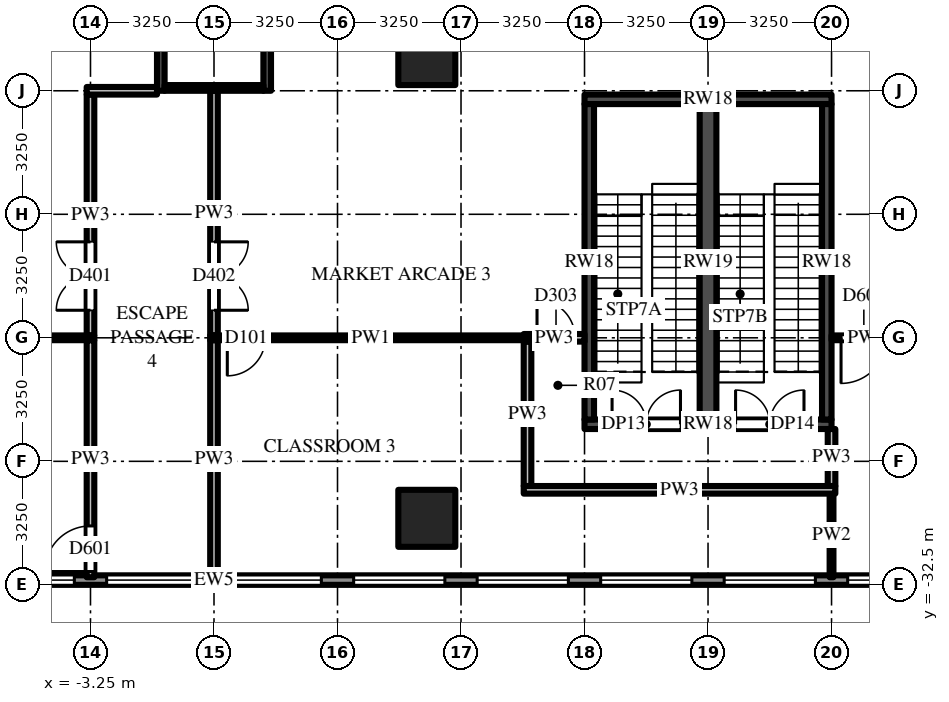
"""IFC4 building model, lengths in metres.
Left out: names, types, materials, properties, quantities, classifications, styles, units other than length and angle.
Written with IfcOpenShell. Run it as: python <this file> out.ifc"""

import sys

from ifc_helpers import new_model, si_unit, direction, frame, frame_2d, origin, origin_2d, place, context, subcontext, project, spatial, rectangle, extrude, source, transform, mapped, element, fill, save


model = new_model("IFC4")
c1 = context("Model", 3, precision=1e-05, world=origin(), true_north=direction((0.0, 1.0)))
c2 = subcontext(c1, "Body", "Model", "MODEL_VIEW")
j1 = project(units=[si_unit("LENGTHUNIT", "METRE"), si_unit("PLANEANGLEUNIT", "RADIAN")], contexts=[c1])
p1 = place(None, origin())
s1 = spatial("IfcSite", under=j1, at=p1, CompositionType="ELEMENT")
p2 = place(p1, origin())
s2 = spatial("IfcBuilding", under=s1, at=p2, CompositionType="ELEMENT")
p3 = place(p2, frame((0.0, 0.0, 24.0)))
s3 = spatial("IfcBuildingStorey", under=s2, at=p3, CompositionType="ELEMENT", Elevation=24.0)
m1 = source(origin(), c2, "Body", "SweptSolid", [
    extrude(rectangle(XDim=1.5, YDim=1.5, at=origin_2d()), origin(), (0.0, 0.0, 1.0), 5.0),
])
for number, where, z_axis, x_axis in (
    (1, (5.6, -18.6, 0.0), (0.0, 0.0, 1.0), (1.0, 0.0, 0.0)),
    (2, (5.6, -30.75, 0.0), (0.0, 0.0, 1.0), (1.0, 0.0, 0.0)),
):
    element("IfcColumn", number, at=place(p3, frame(where, z_axis=z_axis, x_axis=x_axis)), inside=s3, PredefinedType="COLUMN", context=c2, shape_type="MappedRepresentation", body=[
        mapped(m1, transform((0.0, 0.0, 0.0))),
    ])
m2 = source(origin(), c2, "Body", "SweptSolid", [
    extrude(rectangle(XDim=6.0, YDim=0.2, at=frame_2d((3.0, 0.0))), origin(), (0.0, 0.0, 1.0), 4.7),
])
for number, where, z_axis, x_axis in (
    (3, (1.4, -13.5, 0.0), (0.0, 0.0, 1.0), (0.0, -1.0, 0.0)),
    (4, (-1.4, -13.5, 0.0), (0.0, 0.0, 1.0), (0.0, -1.0, 0.0)),
):
    element("IfcWall", number, at=place(p3, frame(where, z_axis=z_axis, x_axis=x_axis)), inside=s3, PredefinedType="SHEAR", context=c2, shape_type="MappedRepresentation", body=[
        mapped(m2, transform((0.0, 0.0, 0.0))),
    ])
m3 = source(origin(), c2, "Body", "SweptSolid", [
    extrude(rectangle(XDim=2.6, YDim=0.15, at=frame_2d((1.3, 0.0))), origin(), (0.0, 0.0, 1.0), 4.7),
])
p4 = place(p3, frame((1.3, -19.425, 0.0), z_axis=(0.0, 0.0, 1.0), x_axis=(-1.0, 0.0, 0.0)))
e5 = element("IfcWall", 5, at=p4, inside=s3, PredefinedType="SHEAR", context=c2, shape_type="MappedRepresentation", body=[
    mapped(m3, transform((0.0, 0.0, 0.0))),
])
m4 = source(origin(), c2, "Body", "SweptSolid", [
    extrude(rectangle(XDim=6.5, YDim=0.25, at=frame_2d((3.25, 0.0))), origin(), (0.0, 0.0, 1.0), 4.7),
])
p5 = place(p3, frame((9.75, -28.275, 0.0), z_axis=(0.0, 0.0, 1.0), x_axis=(1.0, 0.0, 0.0)))
e6 = element("IfcWall", 6, at=p5, inside=s3, PredefinedType="SHEAR", context=c2, shape_type="MappedRepresentation", body=[
    mapped(m4, transform((0.0, 0.0, 0.0))),
])
m5 = source(origin(), c2, "Body", "SweptSolid", [
    extrude(rectangle(XDim=1.8, YDim=2.1, at=frame_2d((0.9, 1.05))), frame((0.0, 0.135, 0.0), z_axis=(0.0, -1.0, 0.0), x_axis=(1.0, 0.0, 0.0)), (0.0, 0.0, 1.0), 0.27),
])
p6 = place(p5, frame((0.725, 0.0, 0.0)))
e7 = element("IfcOpeningElement", 7, at=p6, cuts=e6, PredefinedType="OPENING", context=c2, shape_type="MappedRepresentation", body=[
    mapped(m5, transform((0.0, 0.0, 0.0))),
])
p7 = place(p5, frame((3.975, 0.0, 0.0)))
e8 = element("IfcOpeningElement", 8, at=p7, cuts=e6, PredefinedType="OPENING", context=c2, shape_type="MappedRepresentation", body=[
    mapped(m5, transform((0.0, 0.0, 0.0))),
])
p8 = place(p3, frame((9.75, -19.725, 0.0), z_axis=(0.0, 0.0, 1.0), x_axis=(1.0, 0.0, 0.0)))
e9 = element("IfcWall", 9, at=p8, inside=s3, PredefinedType="SHEAR", context=c2, shape_type="MappedRepresentation", body=[
    mapped(m4, transform((0.0, 0.0, 0.0))),
])
m6 = source(origin(), c2, "Body", "SweptSolid", [
    extrude(rectangle(XDim=8.3, YDim=0.25, at=frame_2d((4.15, 0.0))), origin(), (0.0, 0.0, 1.0), 4.7),
])
for number, where, z_axis, x_axis in (
    (10, (9.875, -28.15, 0.0), (0.0, 0.0, 1.0), (0.0, 1.0, 0.0)),
    (11, (16.125, -28.15, 0.0), (0.0, 0.0, 1.0), (0.0, 1.0, 0.0)),
):
    element("IfcWall", number, at=place(p3, frame(where, z_axis=z_axis, x_axis=x_axis)), inside=s3, PredefinedType="SHEAR", context=c2, shape_type="MappedRepresentation", body=[
        mapped(m6, transform((0.0, 0.0, 0.0))),
    ])
m7 = source(origin(), c2, "Body", "SweptSolid", [
    extrude(rectangle(XDim=8.3, YDim=0.44, at=frame_2d((4.15, 0.0))), origin(), (0.0, 0.0, 1.0), 4.7),
])
p9 = place(p3, frame((13.0, -28.15, 0.0), z_axis=(0.0, 0.0, 1.0), x_axis=(0.0, 1.0, 0.0)))
e12 = element("IfcWall", 12, at=p9, inside=s3, PredefinedType="SHEAR", context=c2, shape_type="MappedRepresentation", body=[
    mapped(m7, transform((0.0, 0.0, 0.0))),
])
m8 = source(origin(), c2, "Body", "SweptSolid", [
    extrude(rectangle(XDim=58.5, YDim=0.25, at=frame_2d((29.25, 0.0))), origin(), (0.0, 0.0, 1.0), 4.7),
])
p10 = place(p3, frame((-29.25, -32.375, 0.0), z_axis=(0.0, 0.0, 1.0), x_axis=(1.0, 0.0, 0.0)))
e13 = element("IfcWall", 13, at=p10, inside=s3, PredefinedType="SOLIDWALL", context=c2, shape_type="MappedRepresentation", body=[
    mapped(m8, transform((0.0, 0.0, 0.0))),
])
m9 = source(origin(), c2, "Body", "SweptSolid", [
    extrude(rectangle(XDim=2.4, YDim=3.3, at=frame_2d((1.2, 1.65))), frame((0.0, 0.135, 0.0), z_axis=(0.0, -1.0, 0.0), x_axis=(1.0, 0.0, 0.0)), (0.0, 0.0, 1.0), 0.27),
])
p11 = place(p10, frame((0.425, 0.0, 0.6)))
e14 = element("IfcOpeningElement", 14, at=p11, cuts=e13, PredefinedType="OPENING", context=c2, shape_type="MappedRepresentation", body=[
    mapped(m9, transform((0.0, 0.0, 0.0))),
])
p12 = place(p10, frame((3.675, 0.0, 0.6)))
e15 = element("IfcOpeningElement", 15, at=p12, cuts=e13, PredefinedType="OPENING", context=c2, shape_type="MappedRepresentation", body=[
    mapped(m9, transform((0.0, 0.0, 0.0))),
])
p13 = place(p10, frame((6.925, 0.0, 0.6)))
e16 = element("IfcOpeningElement", 16, at=p13, cuts=e13, PredefinedType="OPENING", context=c2, shape_type="MappedRepresentation", body=[
    mapped(m9, transform((0.0, 0.0, 0.0))),
])
p14 = place(p10, frame((10.175, 0.0, 0.6)))
e17 = element("IfcOpeningElement", 17, at=p14, cuts=e13, PredefinedType="OPENING", context=c2, shape_type="MappedRepresentation", body=[
    mapped(m9, transform((0.0, 0.0, 0.0))),
])
p15 = place(p10, frame((13.425, 0.0, 0.6)))
e18 = element("IfcOpeningElement", 18, at=p15, cuts=e13, PredefinedType="OPENING", context=c2, shape_type="MappedRepresentation", body=[
    mapped(m9, transform((0.0, 0.0, 0.0))),
])
p16 = place(p10, frame((16.675, 0.0, 0.6)))
e19 = element("IfcOpeningElement", 19, at=p16, cuts=e13, PredefinedType="OPENING", context=c2, shape_type="MappedRepresentation", body=[
    mapped(m9, transform((0.0, 0.0, 0.0))),
])
p17 = place(p10, frame((19.925, 0.0, 0.6)))
e20 = element("IfcOpeningElement", 20, at=p17, cuts=e13, PredefinedType="OPENING", context=c2, shape_type="MappedRepresentation", body=[
    mapped(m9, transform((0.0, 0.0, 0.0))),
])
p18 = place(p10, frame((23.175, 0.0, 0.6)))
e21 = element("IfcOpeningElement", 21, at=p18, cuts=e13, PredefinedType="OPENING", context=c2, shape_type="MappedRepresentation", body=[
    mapped(m9, transform((0.0, 0.0, 0.0))),
])
p19 = place(p10, frame((26.425, 0.0, 0.6)))
e22 = element("IfcOpeningElement", 22, at=p19, cuts=e13, PredefinedType="OPENING", context=c2, shape_type="MappedRepresentation", body=[
    mapped(m9, transform((0.0, 0.0, 0.0))),
])
p20 = place(p10, frame((29.675, 0.0, 0.6)))
e23 = element("IfcOpeningElement", 23, at=p20, cuts=e13, PredefinedType="OPENING", context=c2, shape_type="MappedRepresentation", body=[
    mapped(m9, transform((0.0, 0.0, 0.0))),
])
p21 = place(p10, frame((32.925, 0.0, 0.6)))
e24 = element("IfcOpeningElement", 24, at=p21, cuts=e13, PredefinedType="OPENING", context=c2, shape_type="MappedRepresentation", body=[
    mapped(m9, transform((0.0, 0.0, 0.0))),
])
p22 = place(p10, frame((36.175, 0.0, 0.6)))
e25 = element("IfcOpeningElement", 25, at=p22, cuts=e13, PredefinedType="OPENING", context=c2, shape_type="MappedRepresentation", body=[
    mapped(m9, transform((0.0, 0.0, 0.0))),
])
p23 = place(p10, frame((39.425, 0.0, 0.6)))
e26 = element("IfcOpeningElement", 26, at=p23, cuts=e13, PredefinedType="OPENING", context=c2, shape_type="MappedRepresentation", body=[
    mapped(m9, transform((0.0, 0.0, 0.0))),
])
p24 = place(p10, frame((42.675, 0.0, 0.6)))
e27 = element("IfcOpeningElement", 27, at=p24, cuts=e13, PredefinedType="OPENING", context=c2, shape_type="MappedRepresentation", body=[
    mapped(m9, transform((0.0, 0.0, 0.0))),
])
p25 = place(p10, frame((45.925, 0.0, 0.6)))
e28 = element("IfcOpeningElement", 28, at=p25, cuts=e13, PredefinedType="OPENING", context=c2, shape_type="MappedRepresentation", body=[
    mapped(m9, transform((0.0, 0.0, 0.0))),
])
p26 = place(p10, frame((49.175, 0.0, 0.6)))
e29 = element("IfcOpeningElement", 29, at=p26, cuts=e13, PredefinedType="OPENING", context=c2, shape_type="MappedRepresentation", body=[
    mapped(m9, transform((0.0, 0.0, 0.0))),
])
p27 = place(p10, frame((52.425, 0.0, 0.6)))
e30 = element("IfcOpeningElement", 30, at=p27, cuts=e13, PredefinedType="OPENING", context=c2, shape_type="MappedRepresentation", body=[
    mapped(m9, transform((0.0, 0.0, 0.0))),
])
p28 = place(p10, frame((55.675, 0.0, 0.6)))
e31 = element("IfcOpeningElement", 31, at=p28, cuts=e13, PredefinedType="OPENING", context=c2, shape_type="MappedRepresentation", body=[
    mapped(m9, transform((0.0, 0.0, 0.0))),
])
m10 = source(origin(), c2, "Body", "SweptSolid", [
    extrude(rectangle(XDim=3.188, YDim=0.2, at=frame_2d((1.594, 0.0))), origin(), (0.0, 0.0, 1.0), 4.7),
])
p29 = place(p3, frame((-3.25, -25.938, 0.0), z_axis=(0.0, 0.0, 1.0), x_axis=(0.0, 1.0, 0.0)))
e32 = element("IfcWall", 32, at=p29, inside=s3, PredefinedType="PARTITIONING", context=c2, shape_type="MappedRepresentation", body=[
    mapped(m10, transform((0.0, 0.0, 0.0))),
])
m11 = source(origin(), c2, "Body", "SweptSolid", [
    extrude(rectangle(XDim=1.8, YDim=2.1, at=frame_2d((0.9, 1.05))), frame((0.0, 0.11, 0.0), z_axis=(0.0, -1.0, 0.0), x_axis=(1.0, 0.0, 0.0)), (0.0, 0.0, 1.0), 0.22),
])
p30 = place(p29, frame((0.663, 0.0, 0.0)))
e33 = element("IfcOpeningElement", 33, at=p30, cuts=e32, PredefinedType="OPENING", context=c2, shape_type="MappedRepresentation", body=[
    mapped(m11, transform((0.0, 0.0, 0.0))),
])
m12 = source(origin(), c2, "Body", "SweptSolid", [
    extrude(rectangle(XDim=6.238, YDim=0.2, at=frame_2d((3.119, 0.0))), origin(), (0.0, 0.0, 1.0), 3.918),
])
p31 = place(p3, frame((-3.25, -32.3, 0.0), z_axis=(0.0, 0.0, 1.0), x_axis=(0.0, 1.0, 0.0)))
e34 = element("IfcWall", 34, at=p31, inside=s3, PredefinedType="PARTITIONING", context=c2, shape_type="MappedRepresentation", body=[
    mapped(m12, transform((0.0, 0.0, 0.0))),
])
m13 = source(origin(), c2, "Body", "SweptSolid", [
    extrude(rectangle(XDim=1.2, YDim=2.1, at=frame_2d((0.6, 1.05))), frame((0.0, 0.11, 0.0), z_axis=(0.0, -1.0, 0.0), x_axis=(1.0, 0.0, 0.0)), (0.0, 0.0, 1.0), 0.22),
])
p32 = place(p31, frame((0.15, 0.0, 0.0)))
e35 = element("IfcOpeningElement", 35, at=p32, cuts=e34, PredefinedType="OPENING", context=c2, shape_type="MappedRepresentation", body=[
    mapped(m13, transform((0.0, 0.0, 0.0))),
])
m14 = source(origin(), c2, "Body", "SweptSolid", [
    extrude(rectangle(XDim=3.15, YDim=0.2, at=frame_2d((1.575, 0.0))), origin(), (0.0, 0.0, 1.0), 4.7),
])
p33 = place(p3, frame((-3.25, -22.75, 0.0), z_axis=(0.0, 0.0, 1.0), x_axis=(0.0, 1.0, 0.0)))
e36 = element("IfcWall", 36, at=p33, inside=s3, PredefinedType="PARTITIONING", context=c2, shape_type="MappedRepresentation", body=[
    mapped(m14, transform((0.0, 0.0, 0.0))),
])
m15 = source(origin(), c2, "Body", "SweptSolid", [
    extrude(rectangle(XDim=3.188, YDim=0.2, at=frame_2d((1.594, 0.0))), origin(), (0.0, 0.0, 1.0), 3.996),
])
p34 = place(p3, frame((0.0, -22.75, 0.0), z_axis=(0.0, 0.0, 1.0), x_axis=(0.0, -1.0, 0.0)))
e37 = element("IfcWall", 37, at=p34, inside=s3, PredefinedType="PARTITIONING", context=c2, shape_type="MappedRepresentation", body=[
    mapped(m15, transform((0.0, 0.0, 0.0))),
])
p35 = place(p34, frame((0.725, 0.0, 0.0)))
e38 = element("IfcOpeningElement", 38, at=p35, cuts=e37, PredefinedType="OPENING", context=c2, shape_type="MappedRepresentation", body=[
    mapped(m11, transform((0.0, 0.0, 0.0))),
])
p36 = place(p3, frame((0.0, -26.062, 0.0), z_axis=(0.0, 0.0, 1.0), x_axis=(0.0, -1.0, 0.0)))
e39 = element("IfcWall", 39, at=p36, inside=s3, PredefinedType="PARTITIONING", context=c2, shape_type="MappedRepresentation", body=[
    mapped(m12, transform((0.0, 0.0, 0.0))),
])
m16 = source(origin(), c2, "Body", "SweptSolid", [
    extrude(rectangle(XDim=3.25, YDim=0.2, at=frame_2d((1.625, 0.0))), origin(), (0.0, 0.0, 1.0), 3.996),
])
p37 = place(p3, frame((0.0, -22.75, 0.0), z_axis=(0.0, 0.0, 1.0), x_axis=(0.0, 1.0, 0.0)))
e40 = element("IfcWall", 40, at=p37, inside=s3, PredefinedType="PARTITIONING", context=c2, shape_type="MappedRepresentation", body=[
    mapped(m16, transform((0.0, 0.0, 0.0))),
])
m17 = source(origin(), c2, "Body", "SweptSolid", [
    extrude(rectangle(XDim=3.8, YDim=0.2, at=frame_2d((1.9, 0.0))), origin(), (0.0, 0.0, 1.0), 4.274),
])
p38 = place(p3, frame((8.25, -29.9, 0.0), z_axis=(0.0, 0.0, 1.0), x_axis=(0.0, 1.0, 0.0)))
e41 = element("IfcWall", 41, at=p38, inside=s3, PredefinedType="PARTITIONING", context=c2, shape_type="MappedRepresentation", body=[
    mapped(m17, transform((0.0, 0.0, 0.0))),
])
m18 = source(origin(), c2, "Body", "SweptSolid", [
    extrude(rectangle(XDim=1.5, YDim=0.2, at=frame_2d((0.75, 0.0))), origin(), (0.0, 0.0, 1.0), 4.7),
])
p39 = place(p3, frame((16.25, -28.4, 0.0), z_axis=(0.0, 0.0, 1.0), x_axis=(0.0, -1.0, 0.0)))
e42 = element("IfcWall", 42, at=p39, inside=s3, PredefinedType="PARTITIONING", context=c2, shape_type="MappedRepresentation", body=[
    mapped(m18, transform((0.0, 0.0, 0.0))),
])
m19 = source(origin(), c2, "Body", "SweptSolid", [
    extrude(rectangle(XDim=2.2, YDim=0.1, at=frame_2d((1.1, 0.0))), origin(), (0.0, 0.0, 1.0), 3.762),
])
p40 = place(p3, frame((16.25, -32.3, 0.0), z_axis=(0.0, 0.0, 1.0), x_axis=(0.0, 1.0, 0.0)))
e43 = element("IfcWall", 43, at=p40, inside=s3, PredefinedType="PARTITIONING", context=c2, shape_type="MappedRepresentation", body=[
    mapped(m19, transform((0.0, 0.0, 0.0))),
])
m20 = source(origin(), c2, "Body", "SweptSolid", [
    extrude(rectangle(XDim=8.2, YDim=0.2, at=frame_2d((4.1, 0.0))), origin(), (0.0, 0.0, 1.0), 4.7),
])
p41 = place(p3, frame((8.15, -30.0, 0.0), z_axis=(0.0, 0.0, 1.0), x_axis=(1.0, 0.0, 0.0)))
e44 = element("IfcWall", 44, at=p41, inside=s3, PredefinedType="PARTITIONING", context=c2, shape_type="MappedRepresentation", body=[
    mapped(m20, transform((0.0, 0.0, 0.0))),
])
m21 = source(origin(), c2, "Body", "SweptSolid", [
    extrude(rectangle(XDim=1.6, YDim=0.2, at=frame_2d((0.8, 0.0))), origin(), (0.0, 0.0, 1.0), 4.7),
])
p42 = place(p3, frame((8.15, -26.0, 0.0), z_axis=(0.0, 0.0, 1.0), x_axis=(1.0, 0.0, 0.0)))
e45 = element("IfcWall", 45, at=p42, inside=s3, PredefinedType="PARTITIONING", context=c2, shape_type="MappedRepresentation", body=[
    mapped(m21, transform((0.0, 0.0, 0.0))),
])
m22 = source(origin(), c2, "Body", "SweptSolid", [
    extrude(rectangle(XDim=1.0, YDim=2.1, at=frame_2d((0.5, 1.05))), frame((0.0, 0.11, 0.0), z_axis=(0.0, -1.0, 0.0), x_axis=(1.0, 0.0, 0.0)), (0.0, 0.0, 1.0), 0.22),
])
p43 = place(p42, frame((0.35, 0.0, 0.0)))
e46 = element("IfcOpeningElement", 46, at=p43, cuts=e45, PredefinedType="OPENING", context=c2, shape_type="MappedRepresentation", body=[
    mapped(m22, transform((0.0, 0.0, 0.0))),
])
m23 = source(origin(), c2, "Body", "SweptSolid", [
    extrude(rectangle(XDim=5.2, YDim=0.125, at=frame_2d((2.6, 0.0))), origin(), (0.0, 0.0, 1.0), 3.762),
])
p44 = place(p3, frame((-3.15, -26.0, 0.0), z_axis=(0.0, 0.0, 1.0), x_axis=(-1.0, 0.0, 0.0)))
e47 = element("IfcWall", 47, at=p44, inside=s3, PredefinedType="PARTITIONING", context=c2, shape_type="MappedRepresentation", body=[
    mapped(m23, transform((0.0, 0.0, 0.0))),
])
m24 = source(origin(), c2, "Body", "SweptSolid", [
    extrude(rectangle(XDim=8.45, YDim=0.125, at=frame_2d((4.225, 0.0))), origin(), (0.0, 0.0, 1.0), 3.762),
])
p45 = place(p3, frame((8.35, -26.0, 0.0), z_axis=(0.0, 0.0, 1.0), x_axis=(-1.0, 0.0, 0.0)))
e48 = element("IfcWall", 48, at=p45, inside=s3, PredefinedType="PARTITIONING", context=c2, shape_type="MappedRepresentation", body=[
    mapped(m24, transform((0.0, 0.0, 0.0))),
])
m25 = source(origin(), c2, "Body", "SweptSolid", [
    extrude(rectangle(XDim=1.0, YDim=2.1, at=frame_2d((0.5, 1.05))), frame((0.0, 0.073, 0.0), z_axis=(0.0, -1.0, 0.0), x_axis=(1.0, 0.0, 0.0)), (0.0, 0.0, 1.0), 0.145),
])
p46 = place(p45, frame((7.0, 0.0, 0.0)))
e49 = element("IfcOpeningElement", 49, at=p46, cuts=e48, PredefinedType="OPENING", context=c2, shape_type="MappedRepresentation", body=[
    mapped(m25, transform((0.0, 0.0, 0.0))),
])
m26 = source(origin(), c2, "Body", "SweptSolid", [
    extrude(rectangle(XDim=1.85, YDim=0.125, at=frame_2d((0.925, 0.0))), origin(), (0.0, 0.0, 1.0), 4.7),
])
p47 = place(p3, frame((18.1, -26.0, 0.0), z_axis=(0.0, 0.0, 1.0), x_axis=(-1.0, 0.0, 0.0)))
e50 = element("IfcWall", 50, at=p47, inside=s3, PredefinedType="PARTITIONING", context=c2, shape_type="MappedRepresentation", body=[
    mapped(m26, transform((0.0, 0.0, 0.0))),
])
m27 = source(origin(), c2, "Body", "SweptSolid", [
    extrude(rectangle(XDim=1.2, YDim=2.1, at=frame_2d((0.6, 1.05))), frame((0.0, 0.073, 0.0), z_axis=(0.0, -1.0, 0.0), x_axis=(1.0, 0.0, 0.0)), (0.0, 0.0, 1.0), 0.145),
])
p48 = place(p47, frame((0.4, 0.0, 0.0)))
e51 = element("IfcOpeningElement", 51, at=p48, cuts=e50, PredefinedType="OPENING", context=c2, shape_type="MappedRepresentation", body=[
    mapped(m27, transform((0.0, 0.0, 0.0))),
])
m28 = source(origin(), c2, "Body", "SweptSolid", [
    extrude(rectangle(XDim=1.85, YDim=0.2, at=frame_2d((0.925, 0.0))), origin(), (0.0, 0.0, 1.0), 3.996),
])
p49 = place(p3, frame((-3.35, -19.5, 0.0), z_axis=(0.0, 0.0, 1.0), x_axis=(1.0, 0.0, 0.0)))
e52 = element("IfcWall", 52, at=p49, inside=s3, PredefinedType="PARTITIONING", context=c2, shape_type="MappedRepresentation", body=[
    mapped(m28, transform((0.0, 0.0, 0.0))),
])
m29 = source(origin(), c2, "Body", "SweptSolid", [
    extrude(rectangle(XDim=1.8, YDim=2.1, at=frame_2d((0.9, 1.05))), frame((0.0, 0.025, 0.0), z_axis=(0.0, -1.0, 0.0), x_axis=(1.0, 0.0, 0.0)), (0.0, 0.0, 1.0), 0.05),
])
p50 = place(p6, origin())
e53 = element("IfcDoor", 53, at=p50, inside=s3, OperationType="DOUBLE_DOOR_SINGLE_SWING", PredefinedType="DOOR", context=c2, shape_type="MappedRepresentation", body=[
    mapped(m29, transform((0.0, 0.0, 0.0))),
])
fill(e7, e53)
p51 = place(p7, origin())
e54 = element("IfcDoor", 54, at=p51, inside=s3, OperationType="DOUBLE_DOOR_SINGLE_SWING", PredefinedType="DOOR", context=c2, shape_type="MappedRepresentation", body=[
    mapped(m29, transform((0.0, 0.0, 0.0))),
])
fill(e8, e54)
m30 = source(origin(), c2, "Body", "SweptSolid", [
    extrude(rectangle(XDim=2.4, YDim=3.3, at=frame_2d((1.2, 1.65))), frame((0.0, 0.03, 0.0), z_axis=(0.0, -1.0, 0.0), x_axis=(1.0, 0.0, 0.0)), (0.0, 0.0, 1.0), 0.06),
])
p52 = place(p18, origin())
e55 = element("IfcWindow", 55, at=p52, inside=s3, PartitioningType="SINGLE_PANEL", PredefinedType="WINDOW", context=c2, shape_type="MappedRepresentation", body=[
    mapped(m30, transform((0.0, 0.0, 0.0))),
])
fill(e21, e55)
p53 = place(p19, origin())
e56 = element("IfcWindow", 56, at=p53, inside=s3, PartitioningType="SINGLE_PANEL", PredefinedType="WINDOW", context=c2, shape_type="MappedRepresentation", body=[
    mapped(m30, transform((0.0, 0.0, 0.0))),
])
fill(e22, e56)
p54 = place(p20, origin())
e57 = element("IfcWindow", 57, at=p54, inside=s3, PartitioningType="SINGLE_PANEL", PredefinedType="WINDOW", context=c2, shape_type="MappedRepresentation", body=[
    mapped(m30, transform((0.0, 0.0, 0.0))),
])
fill(e23, e57)
p55 = place(p21, origin())
e58 = element("IfcWindow", 58, at=p55, inside=s3, PartitioningType="SINGLE_PANEL", PredefinedType="WINDOW", context=c2, shape_type="MappedRepresentation", body=[
    mapped(m30, transform((0.0, 0.0, 0.0))),
])
fill(e24, e58)
p56 = place(p22, origin())
e59 = element("IfcWindow", 59, at=p56, inside=s3, PartitioningType="SINGLE_PANEL", PredefinedType="WINDOW", context=c2, shape_type="MappedRepresentation", body=[
    mapped(m30, transform((0.0, 0.0, 0.0))),
])
fill(e25, e59)
p57 = place(p23, origin())
e60 = element("IfcWindow", 60, at=p57, inside=s3, PartitioningType="SINGLE_PANEL", PredefinedType="WINDOW", context=c2, shape_type="MappedRepresentation", body=[
    mapped(m30, transform((0.0, 0.0, 0.0))),
])
fill(e26, e60)
p58 = place(p24, origin())
e61 = element("IfcWindow", 61, at=p58, inside=s3, PartitioningType="SINGLE_PANEL", PredefinedType="WINDOW", context=c2, shape_type="MappedRepresentation", body=[
    mapped(m30, transform((0.0, 0.0, 0.0))),
])
fill(e27, e61)
p59 = place(p25, origin())
e62 = element("IfcWindow", 62, at=p59, inside=s3, PartitioningType="SINGLE_PANEL", PredefinedType="WINDOW", context=c2, shape_type="MappedRepresentation", body=[
    mapped(m30, transform((0.0, 0.0, 0.0))),
])
fill(e28, e62)
m31 = source(origin(), c2, "Body", "SweptSolid", [
    extrude(rectangle(XDim=1.2, YDim=2.1, at=frame_2d((0.6, 1.05))), frame((0.0, 0.025, 0.0), z_axis=(0.0, -1.0, 0.0), x_axis=(1.0, 0.0, 0.0)), (0.0, 0.0, 1.0), 0.05),
])
p60 = place(p32, origin())
e63 = element("IfcDoor", 63, at=p60, inside=s3, OperationType="SINGLE_SWING_LEFT", PredefinedType="DOOR", context=c2, shape_type="MappedRepresentation", body=[
    mapped(m31, transform((0.0, 0.0, 0.0))),
])
fill(e35, e63)
m32 = source(origin(), c2, "Body", "SweptSolid", [
    extrude(rectangle(XDim=1.0, YDim=2.1, at=frame_2d((0.5, 1.05))), frame((0.0, 0.025, 0.0), z_axis=(0.0, -1.0, 0.0), x_axis=(1.0, 0.0, 0.0)), (0.0, 0.0, 1.0), 0.05),
])
p61 = place(p46, origin())
e64 = element("IfcDoor", 64, at=p61, inside=s3, OperationType="SINGLE_SWING_RIGHT", PredefinedType="DOOR", context=c2, shape_type="MappedRepresentation", body=[
    mapped(m32, transform((0.0, 0.0, 0.0))),
])
fill(e49, e64)
p62 = place(p43, origin())
e65 = element("IfcDoor", 65, at=p62, inside=s3, OperationType="SINGLE_SWING_LEFT", PredefinedType="DOOR", context=c2, shape_type="MappedRepresentation", body=[
    mapped(m32, transform((0.0, 0.0, 0.0))),
])
fill(e46, e65)
p63 = place(p48, origin())
e66 = element("IfcDoor", 66, at=p63, inside=s3, OperationType="SINGLE_SWING_RIGHT", PredefinedType="DOOR", context=c2, shape_type="MappedRepresentation", body=[
    mapped(m31, transform((0.0, 0.0, 0.0))),
])
fill(e51, e66)
p64 = place(p30, origin())
e67 = element("IfcDoor", 67, at=p64, inside=s3, OperationType="DOUBLE_DOOR_SINGLE_SWING", PredefinedType="DOOR", context=c2, shape_type="MappedRepresentation", body=[
    mapped(m29, transform((0.0, 0.0, 0.0))),
])
fill(e33, e67)
p65 = place(p35, origin())
e68 = element("IfcDoor", 68, at=p65, inside=s3, OperationType="DOUBLE_DOOR_SINGLE_SWING", PredefinedType="DOOR", context=c2, shape_type="MappedRepresentation", body=[
    mapped(m29, transform((0.0, 0.0, 0.0))),
])
fill(e38, e68)
save(model, sys.argv[1])
